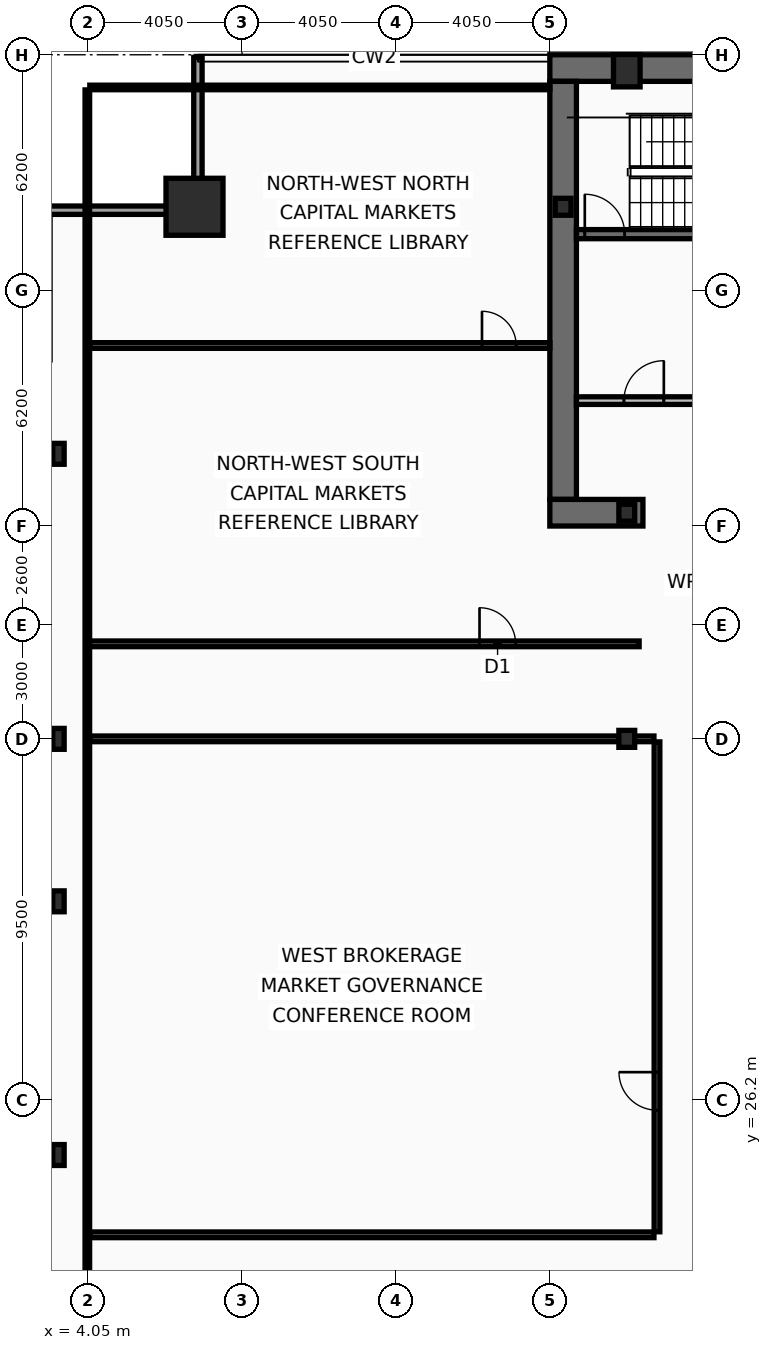
"""IFC4 building model, lengths in metres.
Left out: names, types, materials, properties, quantities, classifications, styles, units other than length and angle.
Written with IfcOpenShell. Run it as: python <this file> out.ifc"""

import sys

from ifc_helpers import new_model, si_unit, direction, frame, frame_2d, origin, origin_2d, place, context, subcontext, project, spatial, rectangle, hollow_rectangle, i_section, extrude, element, fill, save


model = new_model("IFC4")
c1 = context("Model", 3, precision=1e-05, world=origin(), true_north=direction((0.0, 1.0)))
c2 = subcontext(c1, "Body", "Model", "MODEL_VIEW")
j1 = project(units=[si_unit("LENGTHUNIT", "METRE"), si_unit("PLANEANGLEUNIT", "RADIAN")], contexts=[c1])
p1 = place(None, origin())
s1 = spatial("IfcSite", under=j1, at=p1, CompositionType="ELEMENT")
p2 = place(p1, origin())
s2 = spatial("IfcBuilding", under=s1, at=p2, CompositionType="ELEMENT")
p3 = place(p2, frame((0.0, 0.0, 118.2)))
s3 = spatial("IfcBuildingStorey", under=s2, at=p3, CompositionType="ELEMENT", Elevation=118.2)
p4 = place(p3, frame((16.2, 53.35, 0.0), z_axis=(0.0, 0.0, 1.0), x_axis=(1.0, 0.0, 0.0)))
e1 = element("IfcWall", 1, at=p4, inside=s3, PredefinedType="SHEAR", context=c2, shape_type="SweptSolid", body=[
    extrude(rectangle(XDim=40.5, YDim=0.7, at=frame_2d((20.25, 0.0))), origin(), (0.0, 0.0, 1.0), 3.44),
])
p5 = place(p3, frame((16.55, 42.0, 0.0), z_axis=(0.0, 0.0, 1.0), x_axis=(0.0, 1.0, 0.0)))
e2 = element("IfcWall", 2, at=p5, inside=s3, PredefinedType="SHEAR", context=c2, shape_type="SweptSolid", body=[
    extrude(rectangle(XDim=11.0, YDim=0.7, at=frame_2d((5.5, 0.0))), origin(), (0.0, 0.0, 1.0), 3.44),
])
p6 = place(p3, frame((18.65, 41.65, 0.0), z_axis=(0.0, 0.0, 1.0), x_axis=(-1.0, 0.0, 0.0)))
e3 = element("IfcWall", 3, at=p6, inside=s3, PredefinedType="SHEAR", context=c2, shape_type="SweptSolid", body=[
    extrude(rectangle(XDim=2.45, YDim=0.7, at=frame_2d((1.225, 0.0))), origin(), (0.0, 0.0, 1.0), 3.44),
])
p7 = place(p3, frame((16.9, 48.98, 0.0), z_axis=(0.0, 0.0, 1.0), x_axis=(1.0, 0.0, 0.0)))
e4 = element("IfcWall", 4, at=p7, inside=s3, PredefinedType="SHEAR", context=c2, shape_type="SweptSolid", body=[
    extrude(rectangle(XDim=7.32, YDim=0.24, at=frame_2d((3.66, 0.0))), origin(), (0.0, 0.0, 1.0), 3.44),
])
p8 = place(p7, frame((0.22, 0.0, 0.0)))
e5 = element("IfcOpeningElement", 5, at=p8, cuts=e4, PredefinedType="OPENING", context=c2, shape_type="SweptSolid", body=[
    extrude(rectangle(XDim=1.05, YDim=2.15, at=frame_2d((0.525, 1.075))), frame((0.0, 0.13, 0.0), z_axis=(0.0, -1.0, 0.0), x_axis=(1.0, 0.0, 0.0)), (0.0, 0.0, 1.0), 0.26),
])
p9 = place(p3, frame((6.85, 49.7, 0.0), z_axis=(0.0, 0.0, 1.0), x_axis=(1.0, 0.0, 0.0)))
e6 = element("IfcColumn", 6, at=p9, inside=s3, PredefinedType="COLUMN", context=c2, shape_type="SweptSolid", body=[
    extrude(hollow_rectangle(XDim=1.5, YDim=1.5, WallThickness=0.07, at=origin_2d()), origin(), (0.0, 0.0, 1.0), 3.6),
])
p10 = place(p3, frame((18.225, 53.28, 0.0), z_axis=(0.0, 0.0, 1.0), x_axis=(1.0, 0.0, 0.0)))
e7 = element("IfcColumn", 7, at=p10, inside=s3, PredefinedType="COLUMN", context=c2, shape_type="SweptSolid", body=[
    extrude(hollow_rectangle(XDim=0.7, YDim=0.85, WallThickness=0.05, at=origin_2d()), origin(), (0.0, 0.0, 1.0), 3.6),
])
for number, where, z_axis, x_axis in (
    (8, (3.27, 24.75, 0.0), (0.0, 0.0, 1.0), (1.0, 0.0, 0.0)),
    (9, (3.27, 31.425, 0.0), (0.0, 0.0, 1.0), (1.0, 0.0, 0.0)),
    (10, (3.27, 35.7, 0.0), (0.0, 0.0, 1.0), (1.0, 0.0, 0.0)),
    (11, (3.27, 43.2, 0.0), (0.0, 0.0, 1.0), (1.0, 0.0, 0.0)),
):
    element("IfcColumn", number, at=place(p3, frame(where, z_axis=z_axis, x_axis=x_axis)), inside=s3, PredefinedType="COLUMN", context=c2, shape_type="SweptSolid", body=[
        extrude(i_section(OverallWidth=0.3, OverallDepth=0.55, WebThickness=0.015, FlangeThickness=0.029, at=origin_2d()), origin(), (0.0, 0.0, 1.0), 3.6),
    ])
for number, where, z_axis, x_axis in (
    (12, (16.55, 49.7, 0.0), (0.0, 0.0, 1.0), (1.0, 0.0, 0.0)),
    (13, (18.225, 35.7, 0.0), (0.0, 0.0, 1.0), (1.0, 0.0, 0.0)),
    (14, (18.225, 41.65, 0.0), (0.0, 0.0, 1.0), (1.0, 0.0, 0.0)),
):
    element("IfcColumn", number, at=place(p3, frame(where, z_axis=z_axis, x_axis=x_axis)), inside=s3, PredefinedType="COLUMN", context=c2, shape_type="SweptSolid", body=[
        extrude(i_section(OverallWidth=0.416, OverallDepth=0.446, WebThickness=0.039, FlangeThickness=0.063, at=origin_2d()), origin(), (0.0, 0.0, 1.0), 3.6),
    ])
p11 = place(p3, frame((2.83, 49.61, 0.0), z_axis=(0.0, 0.0, 1.0), x_axis=(1.0, 0.0, 0.0)))
e15 = element("IfcWall", 15, at=p11, inside=s3, PredefinedType="SOLIDWALL", context=c2, shape_type="SweptSolid", body=[
    extrude(rectangle(XDim=4.22, YDim=0.22, at=frame_2d((2.11, 0.0))), origin(), (0.0, 0.0, 1.0), 2.83),
])
p12 = place(p3, frame((6.94, 49.72, 0.0), z_axis=(0.0, 0.0, 1.0), x_axis=(0.0, 1.0, 0.0)))
e16 = element("IfcWall", 16, at=p12, inside=s3, PredefinedType="SOLIDWALL", context=c2, shape_type="SweptSolid", body=[
    extrude(rectangle(XDim=3.91, YDim=0.22, at=frame_2d((1.955, 0.0))), origin(), (0.0, 0.0, 1.0), 2.83),
])
p13 = place(p3, frame((16.9, 44.6, 0.0), z_axis=(0.0, 0.0, 1.0), x_axis=(1.0, 0.0, 0.0)))
e17 = element("IfcWall", 17, at=p13, inside=s3, PredefinedType="PARTITIONING", context=c2, shape_type="SweptSolid", body=[
    extrude(rectangle(XDim=4.1, YDim=0.2, at=frame_2d((2.05, 0.0))), origin(), (0.0, 0.0, 1.0), 3.44),
])
p14 = place(p13, frame((1.25, 0.0, 0.0)))
e18 = element("IfcOpeningElement", 18, at=p14, cuts=e17, PredefinedType="OPENING", context=c2, shape_type="SweptSolid", body=[
    extrude(rectangle(XDim=1.05, YDim=2.15, at=frame_2d((0.525, 1.075))), frame((0.0, 0.11, 0.0), z_axis=(0.0, -1.0, 0.0), x_axis=(1.0, 0.0, 0.0)), (0.0, 0.0, 1.0), 0.22),
])
p15 = place(p3, frame((4.03, 38.2, 0.0), z_axis=(0.0, 0.0, 1.0), x_axis=(1.0, 0.0, 0.0)))
e19 = element("IfcWall", 19, at=p15, inside=s3, PredefinedType="PARTITIONING", context=c2, shape_type="SweptSolid", body=[
    extrude(rectangle(XDim=14.52, YDim=0.15, at=frame_2d((7.26, 0.0))), origin(), (0.0, 0.0, 1.0), 2.73),
])
p16 = place(p15, frame((10.32, 0.0, 0.0)))
e20 = element("IfcOpeningElement", 20, at=p16, cuts=e19, PredefinedType="OPENING", context=c2, shape_type="SweptSolid", body=[
    extrude(rectangle(XDim=0.95, YDim=2.05, at=frame_2d((0.475, 1.025))), frame((0.0, 0.085, 0.0), z_axis=(0.0, -1.0, 0.0), x_axis=(1.0, 0.0, 0.0)), (0.0, 0.0, 1.0), 0.17),
])
p17 = place(p3, frame((4.095, 46.05, 0.0), z_axis=(0.0, 0.0, 1.0), x_axis=(1.0, 0.0, 0.0)))
e21 = element("IfcWall", 21, at=p17, inside=s3, PredefinedType="PARTITIONING", context=c2, shape_type="SweptSolid", body=[
    extrude(rectangle(XDim=12.105, YDim=0.15, at=frame_2d((6.052, 0.0))), origin(), (0.0, 0.0, 1.0), 2.83),
])
p18 = place(p17, frame((10.32, 0.0, 0.0)))
e22 = element("IfcOpeningElement", 22, at=p18, cuts=e21, PredefinedType="OPENING", context=c2, shape_type="SweptSolid", body=[
    extrude(rectangle(XDim=0.9, YDim=2.05, at=frame_2d((0.45, 1.025))), frame((0.0, 0.085, 0.0), z_axis=(0.0, -1.0, 0.0), x_axis=(1.0, 0.0, 0.0)), (0.0, 0.0, 1.0), 0.17),
])
p19 = place(p3, frame((19.02, 22.73, 0.0), z_axis=(0.0, 0.0, 1.0), x_axis=(0.0, 1.0, 0.0)))
e23 = element("IfcWall", 23, at=p19, inside=s3, PredefinedType="PARTITIONING", context=c2, shape_type="SweptSolid", body=[
    extrude(rectangle(XDim=12.89, YDim=0.15, at=frame_2d((6.445, 0.0))), origin(), (0.0, 0.0, 1.0), 2.88),
])
p20 = place(p19, frame((3.2, 0.0, 0.0)))
e24 = element("IfcOpeningElement", 24, at=p20, cuts=e23, PredefinedType="OPENING", context=c2, shape_type="SweptSolid", body=[
    extrude(rectangle(XDim=1.0, YDim=2.05, at=frame_2d((0.5, 1.025))), frame((0.0, 0.085, 0.0), z_axis=(0.0, -1.0, 0.0), x_axis=(1.0, 0.0, 0.0)), (0.0, 0.0, 1.0), 0.17),
])
for number, where, z_axis, x_axis in (
    (25, (4.095, 22.65, 0.0), (0.0, 0.0, 1.0), (1.0, 0.0, 0.0)),
    (26, (4.095, 35.7, 0.0), (0.0, 0.0, 1.0), (1.0, 0.0, 0.0)),
):
    element("IfcWall", number, at=place(p3, frame(where, z_axis=z_axis, x_axis=x_axis)), inside=s3, PredefinedType="PARTITIONING", context=c2, shape_type="SweptSolid", body=[
        extrude(rectangle(XDim=14.845, YDim=0.15, at=frame_2d((7.422, 0.0))), origin(), (0.0, 0.0, 1.0), 2.73),
    ])
p21 = place(p3, frame((4.03, 10.665, 0.0), z_axis=(0.0, 0.0, 1.0), x_axis=(0.0, 1.0, 0.0)))
e27 = element("IfcWall", 27, at=p21, inside=s3, PredefinedType="PARTITIONING", context=c2, shape_type="SweptSolid", body=[
    extrude(rectangle(XDim=42.11, YDim=0.12, at=frame_2d((21.055, 0.0))), origin(), (0.0, 0.0, 1.0), 2.73),
])
p22 = place(p3, frame((4.095, 52.84, 0.0), z_axis=(0.0, 0.0, 1.0), x_axis=(1.0, 0.0, 0.0)))
e28 = element("IfcWall", 28, at=p22, inside=s3, PredefinedType="PARTITIONING", context=c2, shape_type="SweptSolid", body=[
    extrude(rectangle(XDim=12.105, YDim=0.12, at=frame_2d((6.052, 0.0))), origin(), (0.0, 0.0, 1.0), 3.44),
])
p23 = place(p8, origin())
e29 = element("IfcDoor", 29, at=p23, inside=s3, OperationType="SINGLE_SWING_LEFT", PredefinedType="DOOR", context=c2, shape_type="SweptSolid", body=[
    extrude(rectangle(XDim=1.05, YDim=2.15, at=frame_2d((0.525, 1.075))), frame((0.0, 0.025, 0.0), z_axis=(0.0, -1.0, 0.0), x_axis=(1.0, 0.0, 0.0)), (0.0, 0.0, 1.0), 0.05),
])
fill(e5, e29)
p24 = place(p14, origin())
e30 = element("IfcDoor", 30, at=p24, inside=s3, OperationType="SINGLE_SWING_RIGHT", PredefinedType="DOOR", context=c2, shape_type="SweptSolid", body=[
    extrude(rectangle(XDim=1.05, YDim=2.15, at=frame_2d((0.525, 1.075))), frame((0.0, 0.025, 0.0), z_axis=(0.0, -1.0, 0.0), x_axis=(1.0, 0.0, 0.0)), (0.0, 0.0, 1.0), 0.05),
])
fill(e18, e30)
p25 = place(p16, origin())
e31 = element("IfcDoor", 31, at=p25, inside=s3, OperationType="SINGLE_SWING_LEFT", PredefinedType="DOOR", context=c2, shape_type="SweptSolid", body=[
    extrude(rectangle(XDim=0.95, YDim=2.05, at=frame_2d((0.475, 1.025))), frame((0.0, 0.025, 0.0), z_axis=(0.0, -1.0, 0.0), x_axis=(1.0, 0.0, 0.0)), (0.0, 0.0, 1.0), 0.05),
])
fill(e20, e31)
p26 = place(p18, origin())
e32 = element("IfcDoor", 32, at=p26, inside=s3, OperationType="SINGLE_SWING_LEFT", PredefinedType="DOOR", context=c2, shape_type="SweptSolid", body=[
    extrude(rectangle(XDim=0.9, YDim=2.05, at=frame_2d((0.45, 1.025))), frame((0.0, 0.025, 0.0), z_axis=(0.0, -1.0, 0.0), x_axis=(1.0, 0.0, 0.0)), (0.0, 0.0, 1.0), 0.05),
])
fill(e22, e32)
p27 = place(p20, origin())
e33 = element("IfcDoor", 33, at=p27, inside=s3, OperationType="SINGLE_SWING_RIGHT", PredefinedType="DOOR", context=c2, shape_type="SweptSolid", body=[
    extrude(rectangle(XDim=1.0, YDim=2.05, at=frame_2d((0.5, 1.025))), frame((0.0, 0.025, 0.0), z_axis=(0.0, -1.0, 0.0), x_axis=(1.0, 0.0, 0.0)), (0.0, 0.0, 1.0), 0.05),
])
fill(e24, e33)
save(model, sys.argv[1])
